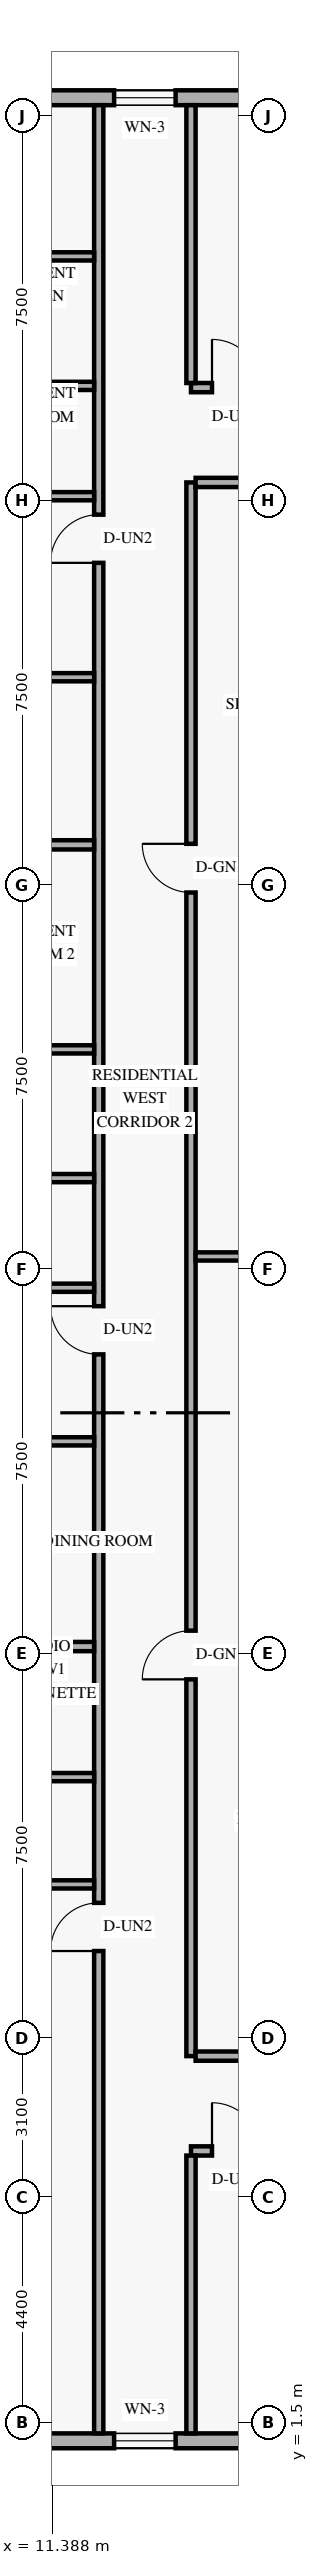
"""IFC4 building model, lengths in metres.
Left out: names, types, materials, properties, quantities, classifications, styles, units other than length and angle.
Written with IfcOpenShell. Run it as: python <this file> out.ifc"""

import sys

from ifc_helpers import new_model, si_unit, direction, frame, frame_2d, origin, place, context, subcontext, project, spatial, rectangle, extrude, element, fill, save


model = new_model("IFC4")
c1 = context("Model", 3, precision=1e-05, world=origin(), true_north=direction((0.0, 1.0)))
c2 = subcontext(c1, "Body", "Model", "MODEL_VIEW")
j1 = project(units=[si_unit("LENGTHUNIT", "METRE"), si_unit("PLANEANGLEUNIT", "RADIAN")], contexts=[c1])
p1 = place(None, origin())
s1 = spatial("IfcSite", under=j1, at=p1, CompositionType="ELEMENT")
p2 = place(p1, origin())
s2 = spatial("IfcBuilding", under=s1, at=p2, CompositionType="ELEMENT")
p3 = place(p2, frame((0.0, 0.0, 24.0)))
s3 = spatial("IfcBuildingStorey", under=s2, at=p3, CompositionType="ELEMENT", Elevation=24.0)
p4 = place(p3, frame((5.42, 1.145, 0.0), z_axis=(0.0, 0.0, 1.0), x_axis=(1.0, 0.0, 0.0)))
e1 = element("IfcWall", 1, at=p4, inside=s3, PredefinedType="SOLIDWALL", context=c2, shape_type="SweptSolid", body=[
    extrude(rectangle(XDim=39.56, YDim=0.29, at=frame_2d((19.78, 0.0))), origin(), (0.0, 0.0, 1.0), 3.36),
])
p5 = place(p4, frame((2.765, 0.0, 0.85)))
e2 = element("IfcOpeningElement", 2, at=p5, cuts=e1, PredefinedType="OPENING", context=c2, shape_type="SweptSolid", body=[
    extrude(rectangle(XDim=1.35, YDim=1.55, at=frame_2d((0.675, 0.775))), frame((0.0, 0.155, 0.0), z_axis=(0.0, -1.0, 0.0), x_axis=(1.0, 0.0, 0.0)), (0.0, 0.0, 1.0), 0.31),
])
p6 = place(p4, frame((7.18, 0.0, 0.85)))
e3 = element("IfcOpeningElement", 3, at=p6, cuts=e1, PredefinedType="OPENING", context=c2, shape_type="SweptSolid", body=[
    extrude(rectangle(XDim=1.2, YDim=1.5, at=frame_2d((0.6, 0.75))), frame((0.0, 0.155, 0.0), z_axis=(0.0, -1.0, 0.0), x_axis=(1.0, 0.0, 0.0)), (0.0, 0.0, 1.0), 0.31),
])
p7 = place(p4, frame((11.17, 0.0, 0.85)))
e4 = element("IfcOpeningElement", 4, at=p7, cuts=e1, PredefinedType="OPENING", context=c2, shape_type="SweptSolid", body=[
    extrude(rectangle(XDim=1.35, YDim=1.55, at=frame_2d((0.675, 0.775))), frame((0.0, 0.155, 0.0), z_axis=(0.0, -1.0, 0.0), x_axis=(1.0, 0.0, 0.0)), (0.0, 0.0, 1.0), 0.31),
])
p8 = place(p4, frame((16.406, 0.0, 0.85)))
e5 = element("IfcOpeningElement", 5, at=p8, cuts=e1, PredefinedType="OPENING", context=c2, shape_type="SweptSolid", body=[
    extrude(rectangle(XDim=1.35, YDim=1.55, at=frame_2d((0.675, 0.775))), frame((0.0, 0.155, 0.0), z_axis=(0.0, -1.0, 0.0), x_axis=(1.0, 0.0, 0.0)), (0.0, 0.0, 1.0), 0.31),
])
p9 = place(p4, frame((21.83, 0.0, 0.85)))
e6 = element("IfcOpeningElement", 6, at=p9, cuts=e1, PredefinedType="OPENING", context=c2, shape_type="SweptSolid", body=[
    extrude(rectangle(XDim=1.35, YDim=1.55, at=frame_2d((0.675, 0.775))), frame((0.0, 0.155, 0.0), z_axis=(0.0, -1.0, 0.0), x_axis=(1.0, 0.0, 0.0)), (0.0, 0.0, 1.0), 0.31),
])
p10 = place(p4, frame((27.255, 0.0, 0.85)))
e7 = element("IfcOpeningElement", 7, at=p10, cuts=e1, PredefinedType="OPENING", context=c2, shape_type="SweptSolid", body=[
    extrude(rectangle(XDim=1.35, YDim=1.55, at=frame_2d((0.675, 0.775))), frame((0.0, 0.155, 0.0), z_axis=(0.0, -1.0, 0.0), x_axis=(1.0, 0.0, 0.0)), (0.0, 0.0, 1.0), 0.31),
])
p11 = place(p4, frame((30.39, 0.0, 0.85)))
e8 = element("IfcOpeningElement", 8, at=p11, cuts=e1, PredefinedType="OPENING", context=c2, shape_type="SweptSolid", body=[
    extrude(rectangle(XDim=1.35, YDim=1.55, at=frame_2d((0.675, 0.775))), frame((0.0, 0.155, 0.0), z_axis=(0.0, -1.0, 0.0), x_axis=(1.0, 0.0, 0.0)), (0.0, 0.0, 1.0), 0.31),
])
p12 = place(p4, frame((35.17, 0.0, 0.85)))
e9 = element("IfcOpeningElement", 9, at=p12, cuts=e1, PredefinedType="OPENING", context=c2, shape_type="SweptSolid", body=[
    extrude(rectangle(XDim=1.35, YDim=1.55, at=frame_2d((0.675, 0.775))), frame((0.0, 0.155, 0.0), z_axis=(0.0, -1.0, 0.0), x_axis=(1.0, 0.0, 0.0)), (0.0, 0.0, 1.0), 0.31),
])
p13 = place(p3, frame((44.98, 46.855, 0.0), z_axis=(0.0, 0.0, 1.0), x_axis=(-1.0, 0.0, 0.0)))
e10 = element("IfcWall", 10, at=p13, inside=s3, PredefinedType="SOLIDWALL", context=c2, shape_type="SweptSolid", body=[
    extrude(rectangle(XDim=39.56, YDim=0.29, at=frame_2d((19.78, 0.0))), origin(), (0.0, 0.0, 1.0), 3.36),
])
p14 = place(p13, frame((35.445, 0.0, 0.85)))
e11 = element("IfcOpeningElement", 11, at=p14, cuts=e10, PredefinedType="OPENING", context=c2, shape_type="SweptSolid", body=[
    extrude(rectangle(XDim=1.35, YDim=1.55, at=frame_2d((0.675, 0.775))), frame((0.0, 0.155, 0.0), z_axis=(0.0, -1.0, 0.0), x_axis=(1.0, 0.0, 0.0)), (0.0, 0.0, 1.0), 0.31),
])
p15 = place(p13, frame((31.18, 0.0, 0.85)))
e12 = element("IfcOpeningElement", 12, at=p15, cuts=e10, PredefinedType="OPENING", context=c2, shape_type="SweptSolid", body=[
    extrude(rectangle(XDim=1.2, YDim=1.5, at=frame_2d((0.6, 0.75))), frame((0.0, 0.155, 0.0), z_axis=(0.0, -1.0, 0.0), x_axis=(1.0, 0.0, 0.0)), (0.0, 0.0, 1.0), 0.31),
])
p16 = place(p13, frame((26.85, 0.0, 0.85)))
e13 = element("IfcOpeningElement", 13, at=p16, cuts=e10, PredefinedType="OPENING", context=c2, shape_type="SweptSolid", body=[
    extrude(rectangle(XDim=1.35, YDim=1.55, at=frame_2d((0.675, 0.775))), frame((0.0, 0.155, 0.0), z_axis=(0.0, -1.0, 0.0), x_axis=(1.0, 0.0, 0.0)), (0.0, 0.0, 1.0), 0.31),
])
p17 = place(p13, frame((21.425, 0.0, 0.85)))
e14 = element("IfcOpeningElement", 14, at=p17, cuts=e10, PredefinedType="OPENING", context=c2, shape_type="SweptSolid", body=[
    extrude(rectangle(XDim=1.35, YDim=1.55, at=frame_2d((0.675, 0.775))), frame((0.0, 0.155, 0.0), z_axis=(0.0, -1.0, 0.0), x_axis=(1.0, 0.0, 0.0)), (0.0, 0.0, 1.0), 0.31),
])
p18 = place(p13, frame((16.19, 0.0, 0.85)))
e15 = element("IfcOpeningElement", 15, at=p18, cuts=e10, PredefinedType="OPENING", context=c2, shape_type="SweptSolid", body=[
    extrude(rectangle(XDim=1.35, YDim=1.55, at=frame_2d((0.675, 0.775))), frame((0.0, 0.155, 0.0), z_axis=(0.0, -1.0, 0.0), x_axis=(1.0, 0.0, 0.0)), (0.0, 0.0, 1.0), 0.31),
])
p19 = place(p13, frame((10.955, 0.0, 0.85)))
e16 = element("IfcOpeningElement", 16, at=p19, cuts=e10, PredefinedType="OPENING", context=c2, shape_type="SweptSolid", body=[
    extrude(rectangle(XDim=1.35, YDim=1.55, at=frame_2d((0.675, 0.775))), frame((0.0, 0.155, 0.0), z_axis=(0.0, -1.0, 0.0), x_axis=(1.0, 0.0, 0.0)), (0.0, 0.0, 1.0), 0.31),
])
p20 = place(p13, frame((7.82, 0.0, 0.85)))
e17 = element("IfcOpeningElement", 17, at=p20, cuts=e10, PredefinedType="OPENING", context=c2, shape_type="SweptSolid", body=[
    extrude(rectangle(XDim=1.35, YDim=1.55, at=frame_2d((0.675, 0.775))), frame((0.0, 0.155, 0.0), z_axis=(0.0, -1.0, 0.0), x_axis=(1.0, 0.0, 0.0)), (0.0, 0.0, 1.0), 0.31),
])
p21 = place(p13, frame((3.04, 0.0, 0.85)))
e18 = element("IfcOpeningElement", 18, at=p21, cuts=e10, PredefinedType="OPENING", context=c2, shape_type="SweptSolid", body=[
    extrude(rectangle(XDim=1.35, YDim=1.55, at=frame_2d((0.675, 0.775))), frame((0.0, 0.155, 0.0), z_axis=(0.0, -1.0, 0.0), x_axis=(1.0, 0.0, 0.0)), (0.0, 0.0, 1.0), 0.31),
])
p22 = place(p3, frame((14.1, 6.8, 0.0), z_axis=(0.0, 0.0, 1.0), x_axis=(1.0, 0.0, 0.0)))
e19 = element("IfcWall", 19, at=p22, inside=s3, PredefinedType="STANDARD", context=c2, shape_type="SweptSolid", body=[
    extrude(rectangle(XDim=21.32, YDim=0.18, at=frame_2d((10.66, 0.0))), origin(), (0.0, 0.0, 1.0), 2.649),
])
p23 = place(p22, frame((0.41, 0.0, 0.0)))
e20 = element("IfcOpeningElement", 20, at=p23, cuts=e19, PredefinedType="OPENING", context=c2, shape_type="SweptSolid", body=[
    extrude(rectangle(XDim=0.94, YDim=2.15, at=frame_2d((0.47, 1.075))), frame((0.0, 0.1, 0.0), z_axis=(0.0, -1.0, 0.0), x_axis=(1.0, 0.0, 0.0)), (0.0, 0.0, 1.0), 0.2),
])
p24 = place(p22, frame((10.88, 0.0, 0.0)))
e21 = element("IfcOpeningElement", 21, at=p24, cuts=e19, PredefinedType="OPENING", context=c2, shape_type="SweptSolid", body=[
    extrude(rectangle(XDim=0.94, YDim=2.15, at=frame_2d((0.47, 1.075))), frame((0.0, 0.1, 0.0), z_axis=(0.0, -1.0, 0.0), x_axis=(1.0, 0.0, 0.0)), (0.0, 0.0, 1.0), 0.2),
])
p25 = place(p3, frame((14.1, 41.2, 0.0), z_axis=(0.0, 0.0, 1.0), x_axis=(1.0, 0.0, 0.0)))
e22 = element("IfcWall", 22, at=p25, inside=s3, PredefinedType="STANDARD", context=c2, shape_type="SweptSolid", body=[
    extrude(rectangle(XDim=21.32, YDim=0.18, at=frame_2d((10.66, 0.0))), origin(), (0.0, 0.0, 1.0), 2.649),
])
p26 = place(p25, frame((0.41, 0.0, 0.0)))
e23 = element("IfcOpeningElement", 23, at=p26, cuts=e22, PredefinedType="OPENING", context=c2, shape_type="SweptSolid", body=[
    extrude(rectangle(XDim=0.94, YDim=2.15, at=frame_2d((0.47, 1.075))), frame((0.0, 0.1, 0.0), z_axis=(0.0, -1.0, 0.0), x_axis=(1.0, 0.0, 0.0)), (0.0, 0.0, 1.0), 0.2),
])
p27 = place(p25, frame((11.26, 0.0, 0.0)))
e24 = element("IfcOpeningElement", 24, at=p27, cuts=e22, PredefinedType="OPENING", context=c2, shape_type="SweptSolid", body=[
    extrude(rectangle(XDim=0.94, YDim=2.15, at=frame_2d((0.47, 1.075))), frame((0.0, 0.1, 0.0), z_axis=(0.0, -1.0, 0.0), x_axis=(1.0, 0.0, 0.0)), (0.0, 0.0, 1.0), 0.2),
])
p28 = place(p3, frame((12.3, 1.29, 0.0), z_axis=(0.0, 0.0, 1.0), x_axis=(0.0, 1.0, 0.0)))
e25 = element("IfcWall", 25, at=p28, inside=s3, PredefinedType="STANDARD", context=c2, shape_type="SweptSolid", body=[
    extrude(rectangle(XDim=45.42, YDim=0.18, at=frame_2d((22.71, 0.0))), origin(), (0.0, 0.0, 1.0), 2.649),
])
p29 = place(p28, frame((9.41, 0.0, 0.0)))
e26 = element("IfcOpeningElement", 26, at=p29, cuts=e25, PredefinedType="OPENING", context=c2, shape_type="SweptSolid", body=[
    extrude(rectangle(XDim=0.94, YDim=2.15, at=frame_2d((0.47, 1.075))), frame((0.0, 0.1, 0.0), z_axis=(0.0, -1.0, 0.0), x_axis=(1.0, 0.0, 0.0)), (0.0, 0.0, 1.0), 0.2),
])
p30 = place(p28, frame((21.05, 0.0, 0.0)))
e27 = element("IfcOpeningElement", 27, at=p30, cuts=e25, PredefinedType="OPENING", context=c2, shape_type="SweptSolid", body=[
    extrude(rectangle(XDim=0.94, YDim=2.15, at=frame_2d((0.47, 1.075))), frame((0.0, 0.1, 0.0), z_axis=(0.0, -1.0, 0.0), x_axis=(1.0, 0.0, 0.0)), (0.0, 0.0, 1.0), 0.2),
])
p31 = place(p28, frame((36.491, 0.0, 0.0)))
e28 = element("IfcOpeningElement", 28, at=p31, cuts=e25, PredefinedType="OPENING", context=c2, shape_type="SweptSolid", body=[
    extrude(rectangle(XDim=0.94, YDim=2.15, at=frame_2d((0.47, 1.075))), frame((0.0, 0.1, 0.0), z_axis=(0.0, -1.0, 0.0), x_axis=(1.0, 0.0, 0.0)), (0.0, 0.0, 1.0), 0.2),
])
p32 = place(p3, frame((14.1, 8.65, 0.0), z_axis=(0.0, 0.0, 1.0), x_axis=(0.0, 1.0, 0.0)))
e29 = element("IfcWall", 29, at=p32, inside=s3, PredefinedType="STANDARD", context=c2, shape_type="SweptSolid", body=[
    extrude(rectangle(XDim=30.7, YDim=0.18, at=frame_2d((15.35, 0.0))), origin(), (0.0, 0.0, 1.0), 2.649),
])
p33 = place(p32, frame((7.35, 0.0, 0.0)))
e30 = element("IfcOpeningElement", 30, at=p33, cuts=e29, PredefinedType="OPENING", context=c2, shape_type="SweptSolid", body=[
    extrude(rectangle(XDim=0.95, YDim=2.15, at=frame_2d((0.475, 1.075))), frame((0.0, 0.1, 0.0), z_axis=(0.0, -1.0, 0.0), x_axis=(1.0, 0.0, 0.0)), (0.0, 0.0, 1.0), 0.2),
])
p34 = place(p32, frame((22.7, 0.0, 0.0)))
e31 = element("IfcOpeningElement", 31, at=p34, cuts=e29, PredefinedType="OPENING", context=c2, shape_type="SweptSolid", body=[
    extrude(rectangle(XDim=0.95, YDim=2.15, at=frame_2d((0.475, 1.075))), frame((0.0, 0.1, 0.0), z_axis=(0.0, -1.0, 0.0), x_axis=(1.0, 0.0, 0.0)), (0.0, 0.0, 1.0), 0.2),
])
for number, where, z_axis, x_axis in (
    (32, (14.19, 8.65, 0.0), (0.0, 0.0, 1.0), (1.0, 0.0, 0.0)),
    (33, (14.19, 39.35, 0.0), (0.0, 0.0, 1.0), (1.0, 0.0, 0.0)),
):
    element("IfcWall", number, at=place(p3, frame(where, z_axis=z_axis, x_axis=x_axis)), inside=s3, PredefinedType="STANDARD", context=c2, shape_type="SweptSolid", body=[
        extrude(rectangle(XDim=7.37, YDim=0.18, at=frame_2d((3.685, 0.0))), origin(), (0.0, 0.0, 1.0), 2.649),
    ])
for number, where, z_axis, x_axis in (
    (34, (14.1, 1.29, 0.0), (0.0, 0.0, 1.0), (0.0, 1.0, 0.0)),
    (35, (14.1, 41.29, 0.0), (0.0, 0.0, 1.0), (0.0, 1.0, 0.0)),
):
    element("IfcWall", number, at=place(p3, frame(where, z_axis=z_axis, x_axis=x_axis)), inside=s3, PredefinedType="PARTITIONING", context=c2, shape_type="SweptSolid", body=[
        extrude(rectangle(XDim=5.42, YDim=0.18, at=frame_2d((2.71, 0.0))), origin(), (0.0, 0.0, 1.0), 2.809),
    ])
p35 = place(p3, frame((9.376, 12.0, 0.0), z_axis=(0.0, 0.0, 1.0), x_axis=(1.0, 0.0, 0.0)))
e36 = element("IfcWall", 36, at=p35, inside=s3, PredefinedType="PLUMBINGWALL", context=c2, shape_type="SweptSolid", body=[
    extrude(rectangle(XDim=2.834, YDim=0.16, at=frame_2d((1.417, 0.0))), origin(), (0.0, 0.0, 1.0), 2.649),
])
p36 = place(p3, frame((9.536, 14.093, 0.0), z_axis=(0.0, 0.0, 1.0), x_axis=(1.0, 0.0, 0.0)))
e37 = element("IfcWall", 37, at=p36, inside=s3, PredefinedType="PLUMBINGWALL", context=c2, shape_type="SweptSolid", body=[
    extrude(rectangle(XDim=2.674, YDim=0.16, at=frame_2d((1.337, 0.0))), origin(), (0.0, 0.0, 1.0), 2.649),
])
p37 = place(p3, frame((2.09, 16.64, 0.0), z_axis=(0.0, 0.0, 1.0), x_axis=(1.0, 0.0, 0.0)))
e38 = element("IfcWall", 38, at=p37, inside=s3, PredefinedType="PARTITIONING", context=c2, shape_type="SweptSolid", body=[
    extrude(rectangle(XDim=10.12, YDim=0.18, at=frame_2d((5.06, 0.0))), origin(), (0.0, 0.0, 1.0), 2.649),
])
p38 = place(p3, frame((2.09, 28.29, 0.0), z_axis=(0.0, 0.0, 1.0), x_axis=(1.0, 0.0, 0.0)))
e39 = element("IfcWall", 39, at=p38, inside=s3, PredefinedType="PARTITIONING", context=c2, shape_type="SweptSolid", body=[
    extrude(rectangle(XDim=10.12, YDim=0.16, at=frame_2d((5.06, 0.0))), origin(), (0.0, 0.0, 1.0), 2.649),
])
p39 = place(p38, frame((2.145, 0.0, 0.0)))
e40 = element("IfcOpeningElement", 40, at=p39, cuts=e39, PredefinedType="OPENING", context=c2, shape_type="SweptSolid", body=[
    extrude(rectangle(XDim=0.88, YDim=2.14, at=frame_2d((0.44, 1.07))), frame((0.0, 0.09, 0.0), z_axis=(0.0, -1.0, 0.0), x_axis=(1.0, 0.0, 0.0)), (0.0, 0.0, 1.0), 0.18),
])
p40 = place(p38, frame((6.035, 0.0, 0.0)))
e41 = element("IfcOpeningElement", 41, at=p40, cuts=e39, PredefinedType="OPENING", context=c2, shape_type="SweptSolid", body=[
    extrude(rectangle(XDim=0.88, YDim=2.14, at=frame_2d((0.44, 1.07))), frame((0.0, 0.09, 0.0), z_axis=(0.0, -1.0, 0.0), x_axis=(1.0, 0.0, 0.0)), (0.0, 0.0, 1.0), 0.18),
])
p41 = place(p3, frame((9.65, 23.64, 0.0), z_axis=(0.0, 0.0, 1.0), x_axis=(1.0, 0.0, 0.0)))
e42 = element("IfcWall", 42, at=p41, inside=s3, PredefinedType="PLUMBINGWALL", context=c2, shape_type="SweptSolid", body=[
    extrude(rectangle(XDim=2.56, YDim=0.16, at=frame_2d((1.28, 0.0))), origin(), (0.0, 0.0, 1.0), 2.649),
])
p42 = place(p3, frame((9.81, 25.779, 0.0), z_axis=(0.0, 0.0, 1.0), x_axis=(1.0, 0.0, 0.0)))
e43 = element("IfcWall", 43, at=p42, inside=s3, PredefinedType="PLUMBINGWALL", context=c2, shape_type="SweptSolid", body=[
    extrude(rectangle(XDim=2.4, YDim=0.16, at=frame_2d((1.2, 0.0))), origin(), (0.0, 0.0, 1.0), 2.649),
])
p43 = place(p3, frame((2.09, 20.643, 0.0), z_axis=(0.0, 0.0, 1.0), x_axis=(1.0, 0.0, 0.0)))
e44 = element("IfcWall", 44, at=p43, inside=s3, PredefinedType="PARTITIONING", context=c2, shape_type="SweptSolid", body=[
    extrude(rectangle(XDim=10.12, YDim=0.16, at=frame_2d((5.06, 0.0))), origin(), (0.0, 0.0, 1.0), 2.649),
])
p44 = place(p43, frame((4.51, 0.0, 0.0)))
e45 = element("IfcOpeningElement", 45, at=p44, cuts=e44, PredefinedType="OPENING", context=c2, shape_type="SweptSolid", body=[
    extrude(rectangle(XDim=0.95, YDim=2.15, at=frame_2d((0.475, 1.075))), frame((0.0, 0.09, 0.0), z_axis=(0.0, -1.0, 0.0), x_axis=(1.0, 0.0, 0.0)), (0.0, 0.0, 1.0), 0.18),
])
p45 = place(p3, frame((2.09, 32.28, 0.0), z_axis=(0.0, 0.0, 1.0), x_axis=(1.0, 0.0, 0.0)))
e46 = element("IfcWall", 46, at=p45, inside=s3, PredefinedType="PARTITIONING", context=c2, shape_type="SweptSolid", body=[
    extrude(rectangle(XDim=10.12, YDim=0.18, at=frame_2d((5.06, 0.0))), origin(), (0.0, 0.0, 1.0), 2.649),
])
p46 = place(p3, frame((2.162, 43.76, 0.0), z_axis=(0.0, 0.0, 1.0), x_axis=(1.0, 0.0, 0.0)))
e47 = element("IfcWall", 47, at=p46, inside=s3, PredefinedType="PARTITIONING", context=c2, shape_type="SweptSolid", body=[
    extrude(rectangle(XDim=10.048, YDim=0.16, at=frame_2d((5.024, 0.0))), origin(), (0.0, 0.0, 1.0), 3.36),
])
p47 = place(p46, frame((2.528, 0.0, 0.0)))
e48 = element("IfcOpeningElement", 48, at=p47, cuts=e47, PredefinedType="OPENING", context=c2, shape_type="SweptSolid", body=[
    extrude(rectangle(XDim=0.9, YDim=2.14, at=frame_2d((0.45, 1.07))), frame((0.0, 0.09, 0.0), z_axis=(0.0, -1.0, 0.0), x_axis=(1.0, 0.0, 0.0)), (0.0, 0.0, 1.0), 0.18),
])
p48 = place(p3, frame((8.43, 39.082, 0.0), z_axis=(0.0, 0.0, 1.0), x_axis=(1.0, 0.0, 0.0)))
e49 = element("IfcWall", 49, at=p48, inside=s3, PredefinedType="PLUMBINGWALL", context=c2, shape_type="SweptSolid", body=[
    extrude(rectangle(XDim=3.78, YDim=0.16, at=frame_2d((1.89, 0.0))), origin(), (0.0, 0.0, 1.0), 3.36),
])
p49 = place(p3, frame((8.59, 41.234, 0.0), z_axis=(0.0, 0.0, 1.0), x_axis=(1.0, 0.0, 0.0)))
e50 = element("IfcWall", 50, at=p49, inside=s3, PredefinedType="PLUMBINGWALL", context=c2, shape_type="SweptSolid", body=[
    extrude(rectangle(XDim=3.62, YDim=0.16, at=frame_2d((1.81, 0.0))), origin(), (0.0, 0.0, 1.0), 2.649),
])
p50 = place(p3, frame((2.09, 35.55, 0.0), z_axis=(0.0, 0.0, 1.0), x_axis=(1.0, 0.0, 0.0)))
e51 = element("IfcWall", 51, at=p50, inside=s3, PredefinedType="PARTITIONING", context=c2, shape_type="SweptSolid", body=[
    extrude(rectangle(XDim=10.12, YDim=0.16, at=frame_2d((5.06, 0.0))), origin(), (0.0, 0.0, 1.0), 2.649),
])
p51 = place(p50, frame((4.51, 0.0, 0.0)))
e52 = element("IfcOpeningElement", 52, at=p51, cuts=e51, PredefinedType="OPENING", context=c2, shape_type="SweptSolid", body=[
    extrude(rectangle(XDim=0.95, YDim=2.15, at=frame_2d((0.475, 1.075))), frame((0.0, 0.09, 0.0), z_axis=(0.0, -1.0, 0.0), x_axis=(1.0, 0.0, 0.0)), (0.0, 0.0, 1.0), 0.18),
])
p52 = place(p3, frame((14.19, 24.25, 0.0), z_axis=(0.0, 0.0, 1.0), x_axis=(1.0, 0.0, 0.0)))
e53 = element("IfcWall", 53, at=p52, inside=s3, PredefinedType="PARTITIONING", context=c2, shape_type="SweptSolid", body=[
    extrude(rectangle(XDim=7.37, YDim=0.16, at=frame_2d((3.685, 0.0))), origin(), (0.0, 0.0, 1.0), 2.649),
])
p53 = place(p6, origin())
e54 = element("IfcWindow", 54, at=p53, inside=s3, PartitioningType="SINGLE_PANEL", PredefinedType="WINDOW", context=c2, shape_type="SweptSolid", body=[
    extrude(rectangle(XDim=1.2, YDim=1.5, at=frame_2d((0.6, 0.75))), frame((0.0, 0.03, 0.0), z_axis=(0.0, -1.0, 0.0), x_axis=(1.0, 0.0, 0.0)), (0.0, 0.0, 1.0), 0.06),
])
fill(e3, e54)
p54 = place(p15, origin())
e55 = element("IfcWindow", 55, at=p54, inside=s3, PartitioningType="SINGLE_PANEL", PredefinedType="WINDOW", context=c2, shape_type="SweptSolid", body=[
    extrude(rectangle(XDim=1.2, YDim=1.5, at=frame_2d((0.6, 0.75))), frame((0.0, 0.03, 0.0), z_axis=(0.0, -1.0, 0.0), x_axis=(1.0, 0.0, 0.0)), (0.0, 0.0, 1.0), 0.06),
])
fill(e12, e55)
p55 = place(p29, origin())
e56 = element("IfcDoor", 56, at=p55, inside=s3, OperationType="SINGLE_SWING_LEFT", PredefinedType="DOOR", context=c2, shape_type="SweptSolid", body=[
    extrude(rectangle(XDim=0.94, YDim=2.15, at=frame_2d((0.47, 1.075))), frame((0.0, 0.025, 0.0), z_axis=(0.0, -1.0, 0.0), x_axis=(1.0, 0.0, 0.0)), (0.0, 0.0, 1.0), 0.05),
])
fill(e26, e56)
p56 = place(p30, origin())
e57 = element("IfcDoor", 57, at=p56, inside=s3, OperationType="SINGLE_SWING_RIGHT", PredefinedType="DOOR", context=c2, shape_type="SweptSolid", body=[
    extrude(rectangle(XDim=0.94, YDim=2.15, at=frame_2d((0.47, 1.075))), frame((0.0, 0.025, 0.0), z_axis=(0.0, -1.0, 0.0), x_axis=(1.0, 0.0, 0.0)), (0.0, 0.0, 1.0), 0.05),
])
fill(e27, e57)
p57 = place(p31, origin())
e58 = element("IfcDoor", 58, at=p57, inside=s3, OperationType="SINGLE_SWING_LEFT", PredefinedType="DOOR", context=c2, shape_type="SweptSolid", body=[
    extrude(rectangle(XDim=0.94, YDim=2.15, at=frame_2d((0.47, 1.075))), frame((0.0, 0.025, 0.0), z_axis=(0.0, -1.0, 0.0), x_axis=(1.0, 0.0, 0.0)), (0.0, 0.0, 1.0), 0.05),
])
fill(e28, e58)
p58 = place(p33, origin())
e59 = element("IfcDoor", 59, at=p58, inside=s3, OperationType="SINGLE_SWING_LEFT", PredefinedType="DOOR", context=c2, shape_type="SweptSolid", body=[
    extrude(rectangle(XDim=0.95, YDim=2.15, at=frame_2d((0.475, 1.075))), frame((0.0, 0.025, 0.0), z_axis=(0.0, -1.0, 0.0), x_axis=(1.0, 0.0, 0.0)), (0.0, 0.0, 1.0), 0.05),
])
fill(e30, e59)
p59 = place(p34, origin())
e60 = element("IfcDoor", 60, at=p59, inside=s3, OperationType="SINGLE_SWING_RIGHT", PredefinedType="DOOR", context=c2, shape_type="SweptSolid", body=[
    extrude(rectangle(XDim=0.95, YDim=2.15, at=frame_2d((0.475, 1.075))), frame((0.0, 0.025, 0.0), z_axis=(0.0, -1.0, 0.0), x_axis=(1.0, 0.0, 0.0)), (0.0, 0.0, 1.0), 0.05),
])
fill(e31, e60)
p60 = place(p23, origin())
e61 = element("IfcDoor", 61, at=p60, inside=s3, OperationType="SINGLE_SWING_LEFT", PredefinedType="DOOR", context=c2, shape_type="SweptSolid", body=[
    extrude(rectangle(XDim=0.94, YDim=2.15, at=frame_2d((0.47, 1.075))), frame((0.0, 0.025, 0.0), z_axis=(0.0, -1.0, 0.0), x_axis=(1.0, 0.0, 0.0)), (0.0, 0.0, 1.0), 0.05),
])
fill(e20, e61)
p61 = place(p26, origin())
e62 = element("IfcDoor", 62, at=p61, inside=s3, OperationType="SINGLE_SWING_LEFT", PredefinedType="DOOR", context=c2, shape_type="SweptSolid", body=[
    extrude(rectangle(XDim=0.94, YDim=2.15, at=frame_2d((0.47, 1.075))), frame((0.0, 0.025, 0.0), z_axis=(0.0, -1.0, 0.0), x_axis=(1.0, 0.0, 0.0)), (0.0, 0.0, 1.0), 0.05),
])
fill(e23, e62)
save(model, sys.argv[1])
